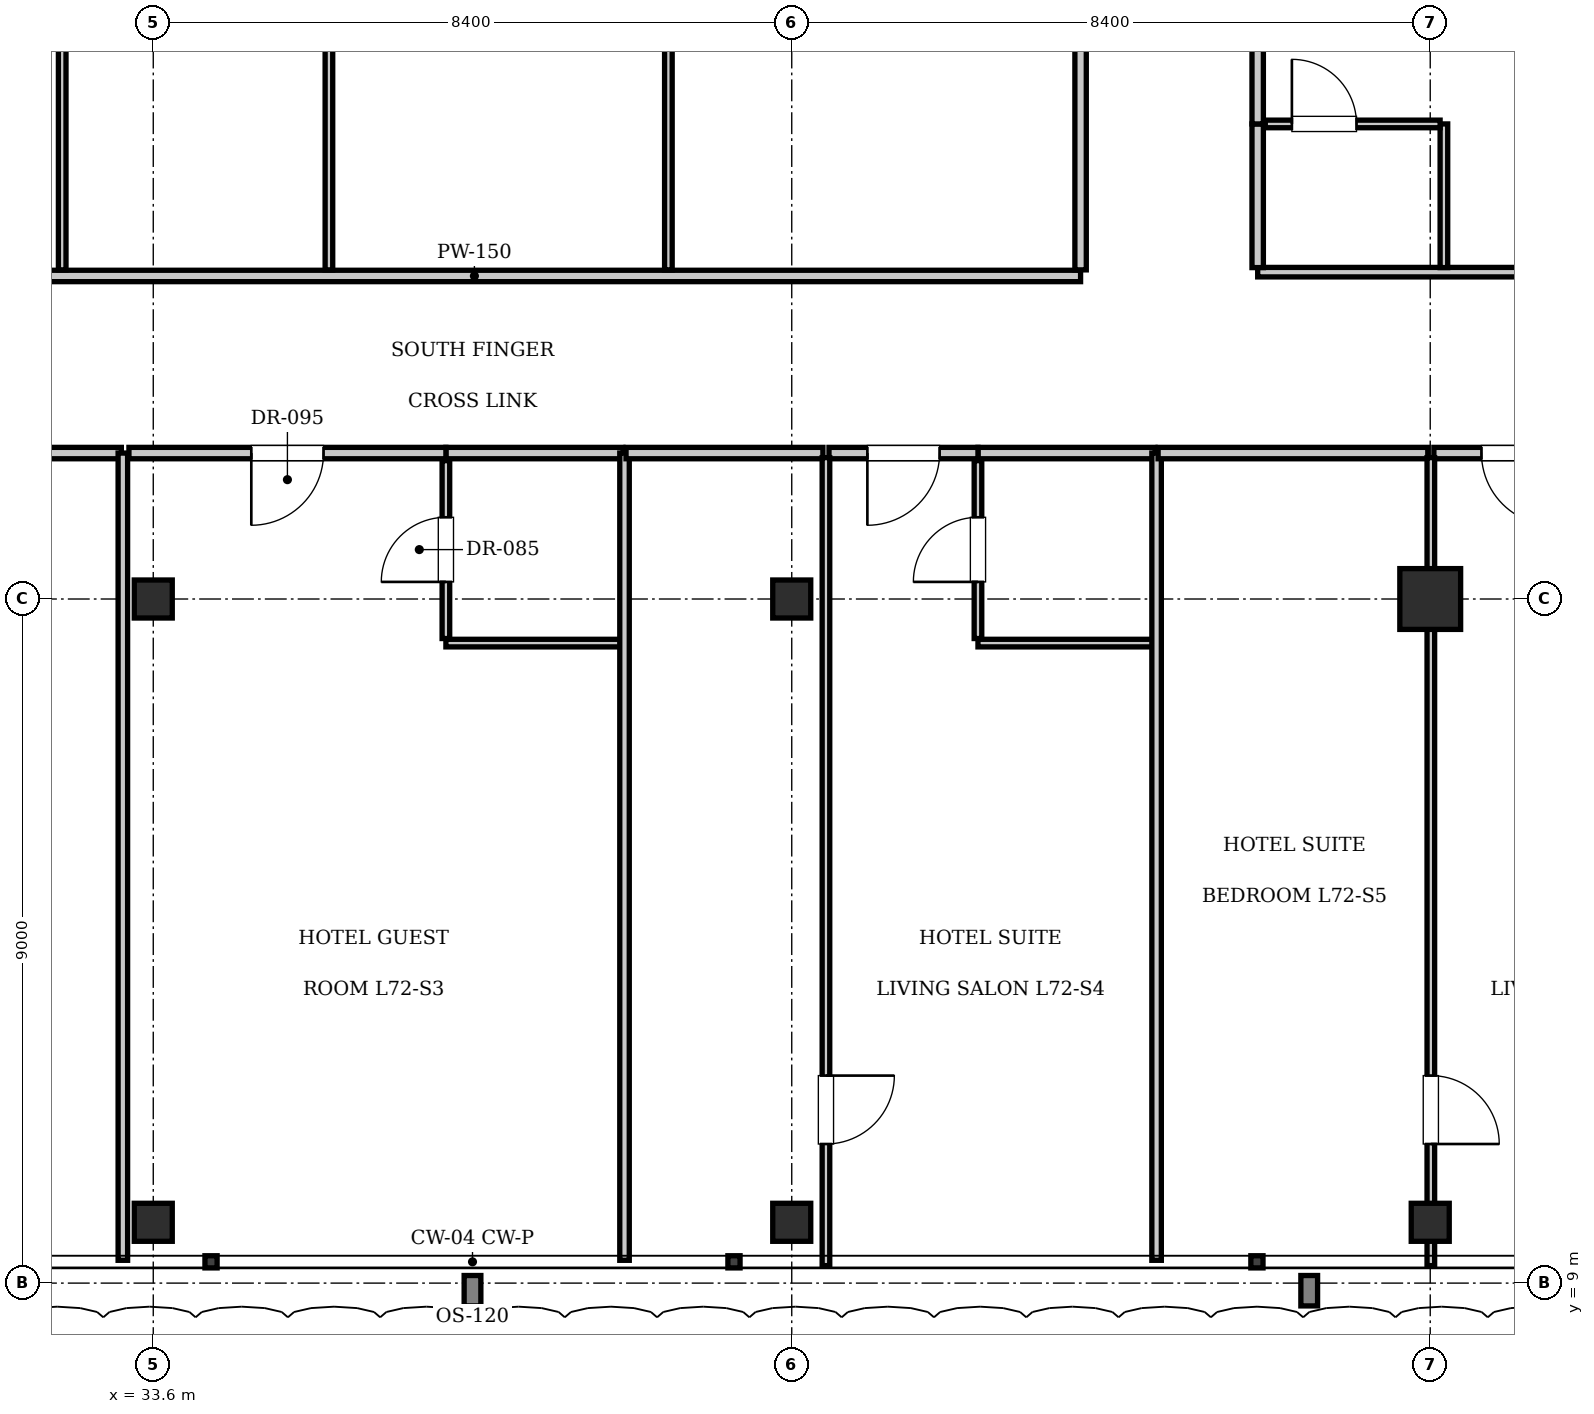
"""IFC4 building model, lengths in metres.
Left out: names, types, materials, properties, quantities, classifications, styles, units other than length and angle.
Written with IfcOpenShell. Run it as: python <this file> out.ifc"""

import sys

from ifc_helpers import new_model, si_unit, direction, frame, frame_2d, origin, origin_2d, place, context, subcontext, project, spatial, rectangle, i_section, extrude, element, fill, save


model = new_model("IFC4")
c1 = context("Model", 3, precision=1e-05, world=origin(), true_north=direction((0.0, 1.0)))
c2 = subcontext(c1, "Body", "Model", "MODEL_VIEW")
j1 = project(units=[si_unit("LENGTHUNIT", "METRE"), si_unit("PLANEANGLEUNIT", "RADIAN")], contexts=[c1])
p1 = place(None, origin())
s1 = spatial("IfcSite", under=j1, at=p1, CompositionType="ELEMENT")
p2 = place(p1, origin())
s2 = spatial("IfcBuilding", under=s1, at=p2, CompositionType="ELEMENT")
p3 = place(p2, frame((0.0, 0.0, 293.3)))
s3 = spatial("IfcBuildingStorey", under=s2, at=p3, CompositionType="ELEMENT", Elevation=293.3)
p4 = place(p3, frame((50.4, 18.0, 0.0), z_axis=(0.0, 0.0, 1.0), x_axis=(1.0, 0.0, 0.0)))
e1 = element("IfcColumn", 1, at=p4, inside=s3, PredefinedType="COLUMN", context=c2, shape_type="SweptSolid", body=[
    extrude(rectangle(XDim=0.8, YDim=0.8, at=origin_2d()), origin(), (0.0, 0.0, 1.0), 3.85),
])
for number, where, z_axis, x_axis in (
    (2, (33.6, 18.0, 0.0), (0.0, 0.0, 1.0), (1.0, 0.0, 0.0)),
    (3, (42.0, 18.0, 0.0), (0.0, 0.0, 1.0), (1.0, 0.0, 0.0)),
    (4, (33.6, 9.8, 0.0), (0.0, 0.0, 1.0), (1.0, 0.0, 0.0)),
    (5, (42.0, 9.8, 0.0), (0.0, 0.0, 1.0), (1.0, 0.0, 0.0)),
    (6, (50.4, 9.8, 0.0), (0.0, 0.0, 1.0), (1.0, 0.0, 0.0)),
):
    element("IfcColumn", number, at=place(p3, frame(where, z_axis=z_axis, x_axis=x_axis)), inside=s3, PredefinedType="COLUMN", context=c2, shape_type="SweptSolid", body=[
        extrude(i_section(OverallWidth=0.5, OverallDepth=0.5, WebThickness=0.022, FlangeThickness=0.032, at=origin_2d()), origin(), (0.0, 0.0, 1.0), 3.85),
    ])
p5 = place(p3, frame((29.85, 22.25, 0.0), z_axis=(0.0, 0.0, 1.0), x_axis=(1.0, 0.0, 0.0)))
e7 = element("IfcWall", 7, at=p5, inside=s3, PredefinedType="PARTITIONING", context=c2, shape_type="SweptSolid", body=[
    extrude(rectangle(XDim=15.95, YDim=0.15, at=frame_2d((7.975, 0.0))), origin(), (0.0, 0.0, 1.0), 3.61),
])
p6 = place(p3, frame((45.8, 22.33, 0.0), z_axis=(0.0, 0.0, 1.0), x_axis=(0.0, 1.0, 0.0)))
e8 = element("IfcWall", 8, at=p6, inside=s3, PredefinedType="PARTITIONING", context=c2, shape_type="SweptSolid", body=[
    extrude(rectangle(XDim=7.69, YDim=0.15, at=frame_2d((3.845, 0.0))), origin(), (0.0, 0.0, 1.0), 3.61),
])
for number, where, z_axis, x_axis in (
    (9, (32.402, 22.33, 0.0), (0.0, 0.0, 1.0), (0.0, 1.0, 0.0)),
    (10, (35.911, 22.33, 0.0), (0.0, 0.0, 1.0), (0.0, 1.0, 0.0)),
    (11, (40.377, 22.33, 0.0), (0.0, 0.0, 1.0), (0.0, 1.0, 0.0)),
):
    element("IfcWall", number, at=place(p3, frame(where, z_axis=z_axis, x_axis=x_axis)), inside=s3, PredefinedType="PARTITIONING", context=c2, shape_type="SweptSolid", body=[
        extrude(rectangle(XDim=7.69, YDim=0.1, at=frame_2d((3.845, 0.0))), origin(), (0.0, 0.0, 1.0), 3.61),
    ])
p7 = place(p3, frame((29.1, 19.92, 0.0), z_axis=(0.0, 0.0, 1.0), x_axis=(1.0, 0.0, 0.0)))
e12 = element("IfcWall", 12, at=p7, inside=s3, PredefinedType="PARTITIONING", context=c2, shape_type="SweptSolid", body=[
    extrude(rectangle(XDim=4.08, YDim=0.15, at=frame_2d((2.04, 0.0))), origin(), (0.0, 0.0, 1.0), 3.61),
])
p8 = place(p7, frame((1.565, 0.0, 0.0)))
e13 = element("IfcOpeningElement", 13, at=p8, cuts=e12, PredefinedType="OPENING", context=c2, shape_type="SweptSolid", body=[
    extrude(rectangle(XDim=0.95, YDim=2.15, at=frame_2d((0.475, 1.075))), frame((0.0, 0.085, 0.0), z_axis=(0.0, -1.0, 0.0), x_axis=(1.0, 0.0, 0.0)), (0.0, 0.0, 1.0), 0.17),
])
p9 = place(p3, frame((33.2, 9.3, 0.0), z_axis=(0.0, 0.0, 1.0), x_axis=(0.0, 1.0, 0.0)))
e14 = element("IfcWall", 14, at=p9, inside=s3, PredefinedType="PARTITIONING", context=c2, shape_type="SweptSolid", body=[
    extrude(rectangle(XDim=10.62, YDim=0.125, at=frame_2d((5.31, 0.0))), origin(), (0.0, 0.0, 1.0), 3.61),
])
p10 = place(p3, frame((37.45, 19.92, 0.0), z_axis=(0.0, 0.0, 1.0), x_axis=(1.0, 0.0, 0.0)))
e15 = element("IfcWall", 15, at=p10, inside=s3, PredefinedType="PARTITIONING", context=c2, shape_type="SweptSolid", body=[
    extrude(rectangle(XDim=2.33, YDim=0.15, at=frame_2d((1.165, 0.0))), origin(), (0.0, 0.0, 1.0), 3.61),
])
p11 = place(p3, frame((37.45, 17.42, 0.0), z_axis=(0.0, 0.0, 1.0), x_axis=(1.0, 0.0, 0.0)))
e16 = element("IfcWall", 16, at=p11, inside=s3, PredefinedType="PARTITIONING", context=c2, shape_type="SweptSolid", body=[
    extrude(rectangle(XDim=2.31, YDim=0.1, at=frame_2d((1.155, 0.0))), origin(), (0.0, 0.0, 1.0), 3.61),
])
p12 = place(p3, frame((37.45, 17.48, 0.0), z_axis=(0.0, 0.0, 1.0), x_axis=(0.0, 1.0, 0.0)))
e17 = element("IfcWall", 17, at=p12, inside=s3, PredefinedType="PARTITIONING", context=c2, shape_type="SweptSolid", body=[
    extrude(rectangle(XDim=2.34, YDim=0.1, at=frame_2d((1.17, 0.0))), origin(), (0.0, 0.0, 1.0), 3.61),
])
p13 = place(p12, frame((0.745, 0.0, 0.0)))
e18 = element("IfcOpeningElement", 18, at=p13, cuts=e17, PredefinedType="OPENING", context=c2, shape_type="SweptSolid", body=[
    extrude(rectangle(XDim=0.85, YDim=2.1, at=frame_2d((0.425, 1.05))), frame((0.0, 0.06, 0.0), z_axis=(0.0, -1.0, 0.0), x_axis=(1.0, 0.0, 0.0)), (0.0, 0.0, 1.0), 0.12),
])
p14 = place(p3, frame((33.28, 19.92, 0.0), z_axis=(0.0, 0.0, 1.0), x_axis=(1.0, 0.0, 0.0)))
e19 = element("IfcWall", 19, at=p14, inside=s3, PredefinedType="PARTITIONING", context=c2, shape_type="SweptSolid", body=[
    extrude(rectangle(XDim=4.17, YDim=0.15, at=frame_2d((2.085, 0.0))), origin(), (0.0, 0.0, 1.0), 3.61),
])
p15 = place(p14, frame((1.61, 0.0, 0.0)))
e20 = element("IfcOpeningElement", 20, at=p15, cuts=e19, PredefinedType="OPENING", context=c2, shape_type="SweptSolid", body=[
    extrude(rectangle(XDim=0.95, YDim=2.15, at=frame_2d((0.475, 1.075))), frame((0.0, 0.085, 0.0), z_axis=(0.0, -1.0, 0.0), x_axis=(1.0, 0.0, 0.0)), (0.0, 0.0, 1.0), 0.17),
])
p16 = place(p3, frame((39.8, 9.3, 0.0), z_axis=(0.0, 0.0, 1.0), x_axis=(0.0, 1.0, 0.0)))
e21 = element("IfcWall", 21, at=p16, inside=s3, PredefinedType="PARTITIONING", context=c2, shape_type="SweptSolid", body=[
    extrude(rectangle(XDim=10.62, YDim=0.125, at=frame_2d((5.31, 0.0))), origin(), (0.0, 0.0, 1.0), 3.61),
])
p17 = place(p3, frame((44.45, 19.92, 0.0), z_axis=(0.0, 0.0, 1.0), x_axis=(1.0, 0.0, 0.0)))
e22 = element("IfcWall", 22, at=p17, inside=s3, PredefinedType="PARTITIONING", context=c2, shape_type="SweptSolid", body=[
    extrude(rectangle(XDim=2.33, YDim=0.15, at=frame_2d((1.165, 0.0))), origin(), (0.0, 0.0, 1.0), 3.61),
])
p18 = place(p3, frame((44.45, 17.42, 0.0), z_axis=(0.0, 0.0, 1.0), x_axis=(1.0, 0.0, 0.0)))
e23 = element("IfcWall", 23, at=p18, inside=s3, PredefinedType="PARTITIONING", context=c2, shape_type="SweptSolid", body=[
    extrude(rectangle(XDim=2.31, YDim=0.1, at=frame_2d((1.155, 0.0))), origin(), (0.0, 0.0, 1.0), 3.61),
])
p19 = place(p3, frame((44.45, 17.48, 0.0), z_axis=(0.0, 0.0, 1.0), x_axis=(0.0, 1.0, 0.0)))
e24 = element("IfcWall", 24, at=p19, inside=s3, PredefinedType="PARTITIONING", context=c2, shape_type="SweptSolid", body=[
    extrude(rectangle(XDim=2.34, YDim=0.1, at=frame_2d((1.17, 0.0))), origin(), (0.0, 0.0, 1.0), 3.61),
])
p20 = place(p19, frame((0.745, 0.0, 0.0)))
e25 = element("IfcOpeningElement", 25, at=p20, cuts=e24, PredefinedType="OPENING", context=c2, shape_type="SweptSolid", body=[
    extrude(rectangle(XDim=0.85, YDim=2.1, at=frame_2d((0.425, 1.05))), frame((0.0, 0.06, 0.0), z_axis=(0.0, -1.0, 0.0), x_axis=(1.0, 0.0, 0.0)), (0.0, 0.0, 1.0), 0.12),
])
p21 = place(p3, frame((39.82, 19.92, 0.0), z_axis=(0.0, 0.0, 1.0), x_axis=(1.0, 0.0, 0.0)))
e26 = element("IfcWall", 26, at=p21, inside=s3, PredefinedType="PARTITIONING", context=c2, shape_type="SweptSolid", body=[
    extrude(rectangle(XDim=2.59, YDim=0.15, at=frame_2d((1.295, 0.0))), origin(), (0.0, 0.0, 1.0), 3.61),
])
p22 = place(p3, frame((42.49, 19.92, 0.0), z_axis=(0.0, 0.0, 1.0), x_axis=(1.0, 0.0, 0.0)))
e27 = element("IfcWall", 27, at=p22, inside=s3, PredefinedType="PARTITIONING", context=c2, shape_type="SweptSolid", body=[
    extrude(rectangle(XDim=1.96, YDim=0.15, at=frame_2d((0.98, 0.0))), origin(), (0.0, 0.0, 1.0), 3.61),
])
p23 = place(p22, frame((0.505, 0.0, 0.0)))
e28 = element("IfcOpeningElement", 28, at=p23, cuts=e27, PredefinedType="OPENING", context=c2, shape_type="SweptSolid", body=[
    extrude(rectangle(XDim=0.95, YDim=2.15, at=frame_2d((0.475, 1.075))), frame((0.0, 0.085, 0.0), z_axis=(0.0, -1.0, 0.0), x_axis=(1.0, 0.0, 0.0)), (0.0, 0.0, 1.0), 0.17),
])
p24 = place(p3, frame((42.45, 9.23, 0.0), z_axis=(0.0, 0.0, 1.0), x_axis=(0.0, 1.0, 0.0)))
e29 = element("IfcWall", 29, at=p24, inside=s3, PredefinedType="PARTITIONING", context=c2, shape_type="SweptSolid", body=[
    extrude(rectangle(XDim=10.63, YDim=0.1, at=frame_2d((5.315, 0.0))), origin(), (0.0, 0.0, 1.0), 3.61),
])
p25 = place(p24, frame((1.6, 0.0, 0.0)))
e30 = element("IfcOpeningElement", 30, at=p25, cuts=e29, PredefinedType="OPENING", context=c2, shape_type="SweptSolid", body=[
    extrude(rectangle(XDim=0.9, YDim=2.1, at=frame_2d((0.45, 1.05))), frame((0.0, 0.06, 0.0), z_axis=(0.0, -1.0, 0.0), x_axis=(1.0, 0.0, 0.0)), (0.0, 0.0, 1.0), 0.12),
])
p26 = place(p3, frame((46.8, 9.3, 0.0), z_axis=(0.0, 0.0, 1.0), x_axis=(0.0, 1.0, 0.0)))
e31 = element("IfcWall", 31, at=p26, inside=s3, PredefinedType="PARTITIONING", context=c2, shape_type="SweptSolid", body=[
    extrude(rectangle(XDim=10.62, YDim=0.125, at=frame_2d((5.31, 0.0))), origin(), (0.0, 0.0, 1.0), 3.61),
])
p27 = place(p3, frame((46.82, 19.92, 0.0), z_axis=(0.0, 0.0, 1.0), x_axis=(1.0, 0.0, 0.0)))
e32 = element("IfcWall", 32, at=p27, inside=s3, PredefinedType="PARTITIONING", context=c2, shape_type="SweptSolid", body=[
    extrude(rectangle(XDim=3.548, YDim=0.15, at=frame_2d((1.774, 0.0))), origin(), (0.0, 0.0, 1.0), 3.61),
])
p28 = place(p3, frame((50.448, 19.92, 0.0), z_axis=(0.0, 0.0, 1.0), x_axis=(1.0, 0.0, 0.0)))
e33 = element("IfcWall", 33, at=p28, inside=s3, PredefinedType="PARTITIONING", context=c2, shape_type="SweptSolid", body=[
    extrude(rectangle(XDim=2.202, YDim=0.15, at=frame_2d((1.101, 0.0))), origin(), (0.0, 0.0, 1.0), 3.61),
])
p29 = place(p28, frame((0.626, 0.0, 0.0)))
e34 = element("IfcOpeningElement", 34, at=p29, cuts=e33, PredefinedType="OPENING", context=c2, shape_type="SweptSolid", body=[
    extrude(rectangle(XDim=0.95, YDim=2.15, at=frame_2d((0.475, 1.075))), frame((0.0, 0.085, 0.0), z_axis=(0.0, -1.0, 0.0), x_axis=(1.0, 0.0, 0.0)), (0.0, 0.0, 1.0), 0.17),
])
p30 = place(p3, frame((50.408, 9.23, 0.0), z_axis=(0.0, 0.0, 1.0), x_axis=(0.0, 1.0, 0.0)))
e35 = element("IfcWall", 35, at=p30, inside=s3, PredefinedType="PARTITIONING", context=c2, shape_type="SweptSolid", body=[
    extrude(rectangle(XDim=10.63, YDim=0.1, at=frame_2d((5.315, 0.0))), origin(), (0.0, 0.0, 1.0), 3.081),
])
p31 = place(p30, frame((1.6, 0.0, 0.0)))
e36 = element("IfcOpeningElement", 36, at=p31, cuts=e35, PredefinedType="OPENING", context=c2, shape_type="SweptSolid", body=[
    extrude(rectangle(XDim=0.9, YDim=2.1, at=frame_2d((0.45, 1.05))), frame((0.0, 0.06, 0.0), z_axis=(0.0, -1.0, 0.0), x_axis=(1.0, 0.0, 0.0)), (0.0, 0.0, 1.0), 0.12),
])
p32 = place(p3, frame((48.13, 22.3, 0.0), z_axis=(0.0, 0.0, 1.0), x_axis=(1.0, 0.0, 0.0)))
e37 = element("IfcWall", 37, at=p32, inside=s3, PredefinedType="PARTITIONING", context=c2, shape_type="SweptSolid", body=[
    extrude(rectangle(XDim=11.97, YDim=0.125, at=frame_2d((5.985, 0.0))), origin(), (0.0, 0.0, 1.0), 3.61),
])
p33 = place(p3, frame((48.13, 22.36, 0.0), z_axis=(0.0, 0.0, 1.0), x_axis=(0.0, 1.0, 0.0)))
e38 = element("IfcWall", 38, at=p33, inside=s3, PredefinedType="PARTITIONING", context=c2, shape_type="SweptSolid", body=[
    extrude(rectangle(XDim=1.89, YDim=0.15, at=frame_2d((0.945, 0.0))), origin(), (0.0, 0.0, 1.0), 3.61),
])
p34 = place(p3, frame((48.13, 24.25, 0.0), z_axis=(0.0, 0.0, 1.0), x_axis=(0.0, 1.0, 0.0)))
e39 = element("IfcWall", 39, at=p34, inside=s3, PredefinedType="PARTITIONING", context=c2, shape_type="SweptSolid", body=[
    extrude(rectangle(XDim=3.03, YDim=0.15, at=frame_2d((1.515, 0.0))), origin(), (0.0, 0.0, 1.0), 3.61),
])
p35 = place(p34, frame((1.04, 0.0, 0.0)))
e40 = element("IfcOpeningElement", 40, at=p35, cuts=e39, PredefinedType="OPENING", context=c2, shape_type="SweptSolid", body=[
    extrude(rectangle(XDim=0.95, YDim=2.15, at=frame_2d((0.475, 1.075))), frame((0.0, 0.085, 0.0), z_axis=(0.0, -1.0, 0.0), x_axis=(1.0, 0.0, 0.0)), (0.0, 0.0, 1.0), 0.17),
])
p36 = place(p3, frame((50.58, 22.36, 0.0), z_axis=(0.0, 0.0, 1.0), x_axis=(0.0, 1.0, 0.0)))
e41 = element("IfcWall", 41, at=p36, inside=s3, PredefinedType="PARTITIONING", context=c2, shape_type="SweptSolid", body=[
    extrude(rectangle(XDim=1.89, YDim=0.1, at=frame_2d((0.945, 0.0))), origin(), (0.0, 0.0, 1.0), 3.61),
])
p37 = place(p3, frame((48.23, 24.25, 0.0), z_axis=(0.0, 0.0, 1.0), x_axis=(1.0, 0.0, 0.0)))
e42 = element("IfcWall", 42, at=p37, inside=s3, PredefinedType="PARTITIONING", context=c2, shape_type="SweptSolid", body=[
    extrude(rectangle(XDim=2.3, YDim=0.1, at=frame_2d((1.15, 0.0))), origin(), (0.0, 0.0, 1.0), 3.61),
])
p38 = place(p37, frame((0.35, 0.0, 0.0)))
e43 = element("IfcOpeningElement", 43, at=p38, cuts=e42, PredefinedType="OPENING", context=c2, shape_type="SweptSolid", body=[
    extrude(rectangle(XDim=0.85, YDim=2.1, at=frame_2d((0.425, 1.05))), frame((0.0, 0.06, 0.0), z_axis=(0.0, -1.0, 0.0), x_axis=(1.0, 0.0, 0.0)), (0.0, 0.0, 1.0), 0.12),
])
p39 = place(p13, origin())
e44 = element("IfcDoor", 44, at=p39, inside=s3, OperationType="SINGLE_SWING_LEFT", PredefinedType="DOOR", context=c2, shape_type="SweptSolid", body=[
    extrude(rectangle(XDim=0.85, YDim=2.1, at=frame_2d((0.425, 1.05))), frame((0.0, 0.025, 0.0), z_axis=(0.0, -1.0, 0.0), x_axis=(1.0, 0.0, 0.0)), (0.0, 0.0, 1.0), 0.05),
])
fill(e18, e44)
p40 = place(p15, frame((0.95, 0.0, 0.0), z_axis=(0.0, 0.0, 1.0), x_axis=(-1.0, 0.0, 0.0)))
e45 = element("IfcDoor", 45, at=p40, inside=s3, OperationType="SINGLE_SWING_RIGHT", PredefinedType="DOOR", context=c2, shape_type="SweptSolid", body=[
    extrude(rectangle(XDim=0.95, YDim=2.15, at=frame_2d((0.475, 1.075))), frame((0.0, 0.025, 0.0), z_axis=(0.0, -1.0, 0.0), x_axis=(1.0, 0.0, 0.0)), (0.0, 0.0, 1.0), 0.05),
])
fill(e20, e45)
p41 = place(p20, origin())
e46 = element("IfcDoor", 46, at=p41, inside=s3, OperationType="SINGLE_SWING_LEFT", PredefinedType="DOOR", context=c2, shape_type="SweptSolid", body=[
    extrude(rectangle(XDim=0.85, YDim=2.1, at=frame_2d((0.425, 1.05))), frame((0.0, 0.025, 0.0), z_axis=(0.0, -1.0, 0.0), x_axis=(1.0, 0.0, 0.0)), (0.0, 0.0, 1.0), 0.05),
])
fill(e25, e46)
p42 = place(p23, frame((0.95, 0.0, 0.0), z_axis=(0.0, 0.0, 1.0), x_axis=(-1.0, 0.0, 0.0)))
e47 = element("IfcDoor", 47, at=p42, inside=s3, OperationType="SINGLE_SWING_RIGHT", PredefinedType="DOOR", context=c2, shape_type="SweptSolid", body=[
    extrude(rectangle(XDim=0.95, YDim=2.15, at=frame_2d((0.475, 1.075))), frame((0.0, 0.025, 0.0), z_axis=(0.0, -1.0, 0.0), x_axis=(1.0, 0.0, 0.0)), (0.0, 0.0, 1.0), 0.05),
])
fill(e28, e47)
p43 = place(p25, frame((0.9, 0.0, 0.0), z_axis=(0.0, 0.0, 1.0), x_axis=(-1.0, 0.0, 0.0)))
e48 = element("IfcDoor", 48, at=p43, inside=s3, OperationType="SINGLE_SWING_LEFT", PredefinedType="DOOR", context=c2, shape_type="SweptSolid", body=[
    extrude(rectangle(XDim=0.9, YDim=2.1, at=frame_2d((0.45, 1.05))), frame((0.0, 0.025, 0.0), z_axis=(0.0, -1.0, 0.0), x_axis=(1.0, 0.0, 0.0)), (0.0, 0.0, 1.0), 0.05),
])
fill(e30, e48)
p44 = place(p29, frame((0.95, 0.0, 0.0), z_axis=(0.0, 0.0, 1.0), x_axis=(-1.0, 0.0, 0.0)))
e49 = element("IfcDoor", 49, at=p44, inside=s3, OperationType="SINGLE_SWING_LEFT", PredefinedType="DOOR", context=c2, shape_type="SweptSolid", body=[
    extrude(rectangle(XDim=0.95, YDim=2.15, at=frame_2d((0.475, 1.075))), frame((0.0, 0.025, 0.0), z_axis=(0.0, -1.0, 0.0), x_axis=(1.0, 0.0, 0.0)), (0.0, 0.0, 1.0), 0.05),
])
fill(e34, e49)
p45 = place(p31, frame((0.9, 0.0, 0.0), z_axis=(0.0, 0.0, 1.0), x_axis=(-1.0, 0.0, 0.0)))
e50 = element("IfcDoor", 50, at=p45, inside=s3, OperationType="SINGLE_SWING_RIGHT", PredefinedType="DOOR", context=c2, shape_type="SweptSolid", body=[
    extrude(rectangle(XDim=0.9, YDim=2.1, at=frame_2d((0.45, 1.05))), frame((0.0, 0.025, 0.0), z_axis=(0.0, -1.0, 0.0), x_axis=(1.0, 0.0, 0.0)), (0.0, 0.0, 1.0), 0.05),
])
fill(e36, e50)
p46 = place(p38, origin())
e51 = element("IfcDoor", 51, at=p46, inside=s3, OperationType="SINGLE_SWING_LEFT", PredefinedType="DOOR", context=c2, shape_type="SweptSolid", body=[
    extrude(rectangle(XDim=0.85, YDim=2.1, at=frame_2d((0.425, 1.05))), frame((0.0, 0.025, 0.0), z_axis=(0.0, -1.0, 0.0), x_axis=(1.0, 0.0, 0.0)), (0.0, 0.0, 1.0), 0.05),
])
fill(e43, e51)
save(model, sys.argv[1])
